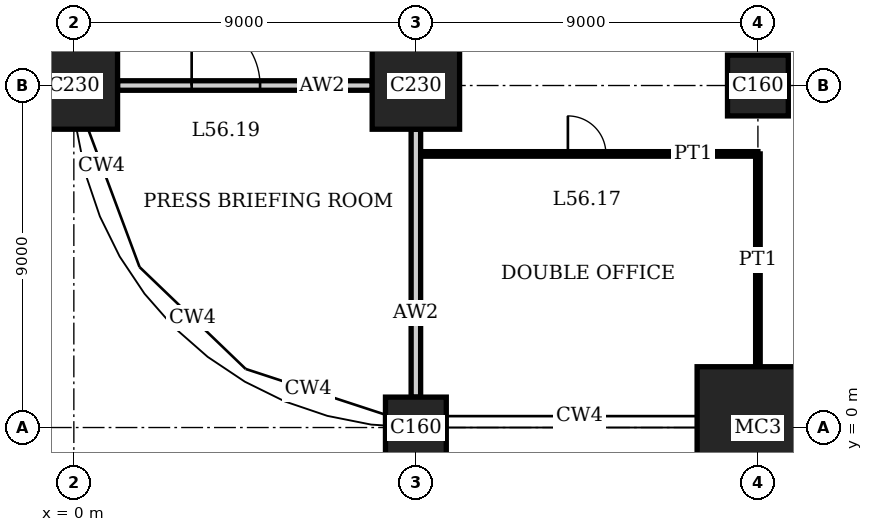
"""IFC4 building model, lengths in metres.
Left out: names, types, materials, properties, quantities, classifications, styles, units other than length and angle.
Written with IfcOpenShell. Run it as: python <this file> out.ifc"""

import sys

from ifc_helpers import new_model, si_unit, direction, frame, frame_2d, origin, origin_2d, place, context, subcontext, project, spatial, rectangle, extrude, element, fill, save


model = new_model("IFC4")
c1 = context("Model", 3, precision=1e-05, world=origin(), true_north=direction((0.0, 1.0)))
c2 = subcontext(c1, "Body", "Model", "MODEL_VIEW")
j1 = project(units=[si_unit("LENGTHUNIT", "METRE"), si_unit("PLANEANGLEUNIT", "RADIAN")], contexts=[c1])
p1 = place(None, origin())
s1 = spatial("IfcSite", under=j1, at=p1, CompositionType="ELEMENT")
p2 = place(p1, origin())
s2 = spatial("IfcBuilding", under=s1, at=p2, CompositionType="ELEMENT")
p3 = place(p2, frame((0.0, 0.0, 230.2)))
s3 = spatial("IfcBuildingStorey", under=s2, at=p3, CompositionType="ELEMENT", Elevation=230.2)
p4 = place(p3, frame((0.0, 9.0, 0.0), z_axis=(0.0, 0.0, 1.0), x_axis=(1.0, 0.0, 0.0)))
e1 = element("IfcColumn", 1, at=p4, inside=s3, PredefinedType="COLUMN", context=c2, shape_type="SweptSolid", body=[
    extrude(rectangle(XDim=2.3, YDim=2.3, at=origin_2d()), origin(), (0.0, 0.0, 1.0), 4.2),
])
p5 = place(p3, frame((9.0, 0.0, 0.0), z_axis=(0.0, 0.0, 1.0), x_axis=(1.0, 0.0, 0.0)))
e2 = element("IfcColumn", 2, at=p5, inside=s3, PredefinedType="COLUMN", context=c2, shape_type="SweptSolid", body=[
    extrude(rectangle(XDim=1.6, YDim=1.6, at=origin_2d()), origin(), (0.0, 0.0, 1.0), 4.2),
])
p6 = place(p3, frame((9.0, 9.0, 0.0), z_axis=(0.0, 0.0, 1.0), x_axis=(1.0, 0.0, 0.0)))
e3 = element("IfcColumn", 3, at=p6, inside=s3, PredefinedType="COLUMN", context=c2, shape_type="SweptSolid", body=[
    extrude(rectangle(XDim=2.3, YDim=2.3, at=origin_2d()), origin(), (0.0, 0.0, 1.0), 4.2),
])
p7 = place(p3, frame((18.0, 0.0, 0.0), z_axis=(0.0, 0.0, 1.0), x_axis=(1.0, 0.0, 0.0)))
e4 = element("IfcColumn", 4, at=p7, inside=s3, PredefinedType="COLUMN", context=c2, shape_type="SweptSolid", body=[
    extrude(rectangle(XDim=3.2, YDim=3.2, at=origin_2d()), origin(), (0.0, 0.0, 1.0), 4.2),
])
p8 = place(p3, frame((18.0, 9.0, 0.0), z_axis=(0.0, 0.0, 1.0), x_axis=(1.0, 0.0, 0.0)))
e5 = element("IfcColumn", 5, at=p8, inside=s3, PredefinedType="COLUMN", context=c2, shape_type="SweptSolid", body=[
    extrude(rectangle(XDim=1.6, YDim=1.6, at=origin_2d()), origin(), (0.0, 0.0, 1.0), 4.2),
])
p9 = place(p3, frame((9.0, 7.2, 0.0), z_axis=(0.0, 0.0, 1.0), x_axis=(1.0, 0.0, 0.0)))
e6 = element("IfcWall", 6, at=p9, inside=s3, PredefinedType="PARTITIONING", context=c2, shape_type="SweptSolid", body=[
    extrude(rectangle(XDim=9.0, YDim=0.12, at=frame_2d((4.5, 0.0))), origin(), (0.0, 0.0, 1.0), 3.85),
])
p10 = place(p9, frame((4.0, 0.0, 0.0)))
e7 = element("IfcOpeningElement", 7, at=p10, cuts=e6, PredefinedType="OPENING", context=c2, shape_type="SweptSolid", body=[
    extrude(rectangle(XDim=1.0, YDim=2.4, at=frame_2d((0.5, 1.2))), frame((0.0, 0.07, 0.0), z_axis=(0.0, -1.0, 0.0), x_axis=(1.0, 0.0, 0.0)), (0.0, 0.0, 1.0), 0.14),
])
p11 = place(p3, frame((1.15, 9.0, 0.0), z_axis=(0.0, 0.0, 1.0), x_axis=(1.0, 0.0, 0.0)))
e8 = element("IfcWall", 8, at=p11, inside=s3, PredefinedType="PARTITIONING", context=c2, shape_type="SweptSolid", body=[
    extrude(rectangle(XDim=6.7, YDim=0.25, at=frame_2d((3.35, 0.0))), origin(), (0.0, 0.0, 1.0), 3.05),
])
p12 = place(p11, frame((1.95, 0.0, 0.0)))
e9 = element("IfcOpeningElement", 9, at=p12, cuts=e8, PredefinedType="OPENING", context=c2, shape_type="SweptSolid", body=[
    extrude(rectangle(XDim=1.8, YDim=2.4, at=frame_2d((0.9, 1.2))), frame((0.0, 0.135, 0.0), z_axis=(0.0, -1.0, 0.0), x_axis=(1.0, 0.0, 0.0)), (0.0, 0.0, 1.0), 0.27),
])
p13 = place(p3, frame((9.0, 0.8, 0.0), z_axis=(0.0, 0.0, 1.0), x_axis=(0.0, 1.0, 0.0)))
e10 = element("IfcWall", 10, at=p13, inside=s3, PredefinedType="PARTITIONING", context=c2, shape_type="SweptSolid", body=[
    extrude(rectangle(XDim=7.05, YDim=0.25, at=frame_2d((3.525, 0.0))), origin(), (0.0, 0.0, 1.0), 3.05),
])
p14 = place(p3, frame((18.0, 1.6, 0.0), z_axis=(0.0, 0.0, 1.0), x_axis=(0.0, 1.0, 0.0)))
e11 = element("IfcWall", 11, at=p14, inside=s3, PredefinedType="PARTITIONING", context=c2, shape_type="SweptSolid", body=[
    extrude(rectangle(XDim=5.6, YDim=0.12, at=frame_2d((2.8, 0.0))), origin(), (0.0, 0.0, 1.0), 3.25),
])
p15 = place(p10, origin())
e12 = element("IfcDoor", 12, at=p15, inside=s3, OperationType="SINGLE_SWING_RIGHT", PredefinedType="DOOR", context=c2, shape_type="SweptSolid", body=[
    extrude(rectangle(XDim=1.0, YDim=2.4, at=frame_2d((0.5, 1.2))), frame((0.0, 0.025, 0.0), z_axis=(0.0, -1.0, 0.0), x_axis=(1.0, 0.0, 0.0)), (0.0, 0.0, 1.0), 0.05),
])
fill(e7, e12)
p16 = place(p12, origin())
e13 = element("IfcDoor", 13, at=p16, inside=s3, OperationType="DOUBLE_DOOR_SINGLE_SWING", PredefinedType="DOOR", context=c2, shape_type="SweptSolid", body=[
    extrude(rectangle(XDim=1.8, YDim=2.4, at=frame_2d((0.9, 1.2))), frame((0.0, 0.025, 0.0), z_axis=(0.0, -1.0, 0.0), x_axis=(1.0, 0.0, 0.0)), (0.0, 0.0, 1.0), 0.05),
])
fill(e9, e13)
save(model, sys.argv[1])
